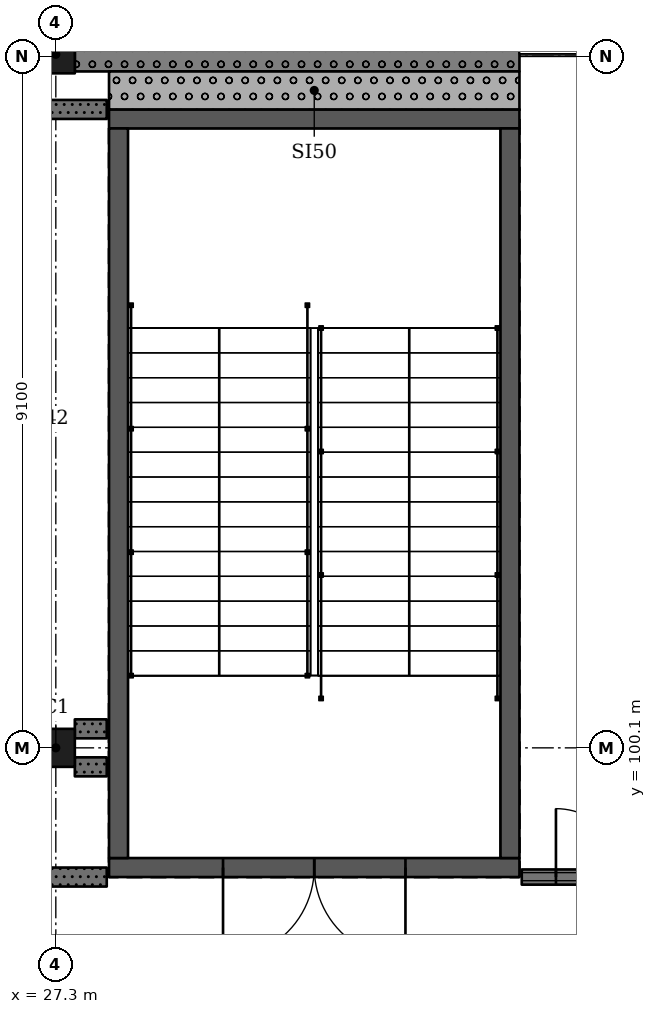
"""IFC4 building model, lengths in metres.
Left out: names, types, materials, properties, quantities, classifications, styles, units other than length and angle.
Written with IfcOpenShell. Run it as: python <this file> out.ifc"""

import sys

from ifc_helpers import new_model, si_unit, direction, frame, frame_2d, origin, origin_2d, place, context, subcontext, project, spatial, rectangle, extrude, element, fill, save


model = new_model("IFC4")
c1 = context("Model", 3, precision=1e-05, world=origin(), true_north=direction((0.0, 1.0)))
c2 = subcontext(c1, "Body", "Model", "MODEL_VIEW")
j1 = project(units=[si_unit("LENGTHUNIT", "METRE"), si_unit("PLANEANGLEUNIT", "RADIAN")], contexts=[c1])
p1 = place(None, origin())
s1 = spatial("IfcSite", under=j1, at=p1, CompositionType="ELEMENT")
p2 = place(p1, origin())
s2 = spatial("IfcBuilding", under=s1, at=p2, CompositionType="ELEMENT")
p3 = place(p2, frame((0.0, 0.0, 20.02)))
s3 = spatial("IfcBuildingStorey", under=s2, at=p3, CompositionType="ELEMENT", Elevation=20.02)
for number, where, z_axis, x_axis in (
    (1, (27.3, 100.1, 0.0), (0.0, 0.0, 1.0), (1.0, 0.0, 0.0)),
    (2, (27.3, 109.225, 0.0), (0.0, 0.0, 1.0), (1.0, 0.0, 0.0)),
):
    element("IfcColumn", number, at=place(p3, frame(where, z_axis=z_axis, x_axis=x_axis)), inside=s3, PredefinedType="COLUMN", context=c2, shape_type="SweptSolid", body=[
        extrude(rectangle(XDim=0.5, YDim=0.5, at=origin_2d()), origin(), (0.0, 0.0, 1.0), 4.55),
    ])
p4 = place(p3, frame((33.4, 98.525, 0.0), z_axis=(0.0, 0.0, 1.0), x_axis=(-1.0, 0.0, 0.0)))
e3 = element("IfcWall", 3, at=p4, inside=s3, PredefinedType="SHEAR", context=c2, shape_type="SweptSolid", body=[
    extrude(rectangle(XDim=5.4, YDim=0.25, at=frame_2d((2.7, 0.0))), origin(), (0.0, 0.0, 1.0), 4.55),
])
p5 = place(p4, frame((1.5, 0.0, 0.0)))
e4 = element("IfcOpeningElement", 4, at=p5, cuts=e3, PredefinedType="OPENING", context=c2, shape_type="SweptSolid", body=[
    extrude(rectangle(XDim=2.4, YDim=2.1, at=frame_2d((1.2, 1.05))), frame((0.0, 0.135, 0.0), z_axis=(0.0, -1.0, 0.0), x_axis=(1.0, 0.0, 0.0)), (0.0, 0.0, 1.0), 0.27),
])
p6 = place(p3, frame((33.4, 108.375, 0.0), z_axis=(0.0, 0.0, 1.0), x_axis=(-1.0, 0.0, 0.0)))
e5 = element("IfcWall", 5, at=p6, inside=s3, PredefinedType="SHEAR", context=c2, shape_type="SweptSolid", body=[
    extrude(rectangle(XDim=5.4, YDim=0.25, at=frame_2d((2.7, 0.0))), origin(), (0.0, 0.0, 1.0), 4.55),
])
for number, where, z_axis, x_axis in (
    (6, (28.125, 108.25, 0.0), (0.0, 0.0, 1.0), (0.0, -1.0, 0.0)),
    (7, (33.275, 108.25, 0.0), (0.0, 0.0, 1.0), (0.0, -1.0, 0.0)),
):
    element("IfcWall", number, at=place(p3, frame(where, z_axis=z_axis, x_axis=x_axis)), inside=s3, PredefinedType="SHEAR", context=c2, shape_type="SweptSolid", body=[
        extrude(rectangle(XDim=9.6, YDim=0.25, at=frame_2d((4.8, 0.0))), origin(), (0.0, 0.0, 1.0), 4.55),
    ])
p7 = place(p3, frame((33.4, 109.175, 0.0), z_axis=(0.0, 0.0, 1.0), x_axis=(-1.0, 0.0, 0.0)))
e8 = element("IfcWall", 8, at=p7, inside=s3, PredefinedType="SOLIDWALL", context=c2, shape_type="SweptSolid", body=[
    extrude(rectangle(XDim=5.85, YDim=0.35, at=frame_2d((2.925, 0.0))), origin(), (0.0, 0.0, 1.0), 3.5),
])
p8 = place(p3, frame((28.0, 108.75, 0.0), z_axis=(0.0, 0.0, 1.0), x_axis=(1.0, 0.0, 0.0)))
e9 = element("IfcWall", 9, at=p8, inside=s3, PredefinedType="SOLIDWALL", context=c2, shape_type="SweptSolid", body=[
    extrude(rectangle(XDim=5.4, YDim=0.5, at=frame_2d((2.7, 0.0))), origin(), (0.0, 0.0, 1.0), 4.25),
])
p9 = place(p3, frame((24.33, 98.4, 0.0), z_axis=(0.0, 0.0, 1.0), x_axis=(1.0, 0.0, 0.0)))
e10 = element("IfcWall", 10, at=p9, inside=s3, PredefinedType="SOLIDWALL", context=c2, shape_type="SweptSolid", body=[
    extrude(rectangle(XDim=3.64, YDim=0.25, at=frame_2d((1.82, 0.0))), origin(), (0.0, 0.0, 1.0), 4.25),
])
p10 = place(p9, frame((1.45, 0.0, 0.0)))
e11 = element("IfcOpeningElement", 11, at=p10, cuts=e10, PredefinedType="OPENING", context=c2, shape_type="SweptSolid", body=[
    extrude(rectangle(XDim=0.8, YDim=2.1, at=frame_2d((0.4, 1.05))), frame((0.0, 0.135, 0.0), z_axis=(0.0, -1.0, 0.0), x_axis=(1.0, 0.0, 0.0)), (0.0, 0.0, 1.0), 0.27),
])
p11 = place(p3, frame((24.33, 108.5, 0.0), z_axis=(0.0, 0.0, 1.0), x_axis=(1.0, 0.0, 0.0)))
e12 = element("IfcWall", 12, at=p11, inside=s3, PredefinedType="SOLIDWALL", context=c2, shape_type="SweptSolid", body=[
    extrude(rectangle(XDim=3.64, YDim=0.25, at=frame_2d((1.82, 0.0))), origin(), (0.0, 0.0, 1.0), 4.25),
])
for number, where, z_axis, x_axis in (
    (13, (27.55, 99.85, 0.0), (0.0, 0.0, 1.0), (1.0, 0.0, 0.0)),
    (14, (27.97, 100.35, 0.0), (0.0, 0.0, 1.0), (-1.0, 0.0, 0.0)),
):
    element("IfcWall", number, at=place(p3, frame(where, z_axis=z_axis, x_axis=x_axis)), inside=s3, PredefinedType="SOLIDWALL", context=c2, shape_type="SweptSolid", body=[
        extrude(rectangle(XDim=0.42, YDim=0.25, at=frame_2d((0.21, 0.0))), origin(), (0.0, 0.0, 1.0), 4.25),
    ])
p12 = place(p3, frame((33.43, 98.4, 0.0), z_axis=(0.0, 0.0, 1.0), x_axis=(1.0, 0.0, 0.0)))
e15 = element("IfcWall", 15, at=p12, inside=s3, PredefinedType="PARTITIONING", context=c2, shape_type="SweptSolid", body=[
    extrude(rectangle(XDim=2.77, YDim=0.2, at=frame_2d((1.385, 0.0))), origin(), (0.0, 0.0, 1.0), 4.25),
])
p13 = place(p12, frame((0.45, 0.0, 0.0)))
e16 = element("IfcOpeningElement", 16, at=p13, cuts=e15, PredefinedType="OPENING", context=c2, shape_type="SweptSolid", body=[
    extrude(rectangle(XDim=1.8, YDim=2.4, at=frame_2d((0.9, 1.2))), frame((0.0, 0.11, 0.0), z_axis=(0.0, -1.0, 0.0), x_axis=(1.0, 0.0, 0.0)), (0.0, 0.0, 1.0), 0.22),
])
p14 = place(p13, origin())
e17 = element("IfcDoor", 17, at=p14, inside=s3, OperationType="DOUBLE_DOOR_SINGLE_SWING", PredefinedType="DOOR", context=c2, shape_type="SweptSolid", body=[
    extrude(rectangle(XDim=1.8, YDim=2.4, at=frame_2d((0.9, 1.2))), frame((0.0, 0.025, 0.0), z_axis=(0.0, -1.0, 0.0), x_axis=(1.0, 0.0, 0.0)), (0.0, 0.0, 1.0), 0.05),
])
fill(e16, e17)
p15 = place(p5, origin())
e18 = element("IfcDoor", 18, at=p15, inside=s3, OperationType="DOUBLE_DOOR_SINGLE_SWING", PredefinedType="DOOR", context=c2, shape_type="SweptSolid", body=[
    extrude(rectangle(XDim=2.4, YDim=2.1, at=frame_2d((1.2, 1.05))), frame((0.0, 0.025, 0.0), z_axis=(0.0, -1.0, 0.0), x_axis=(1.0, 0.0, 0.0)), (0.0, 0.0, 1.0), 0.05),
])
fill(e4, e18)
save(model, sys.argv[1])
